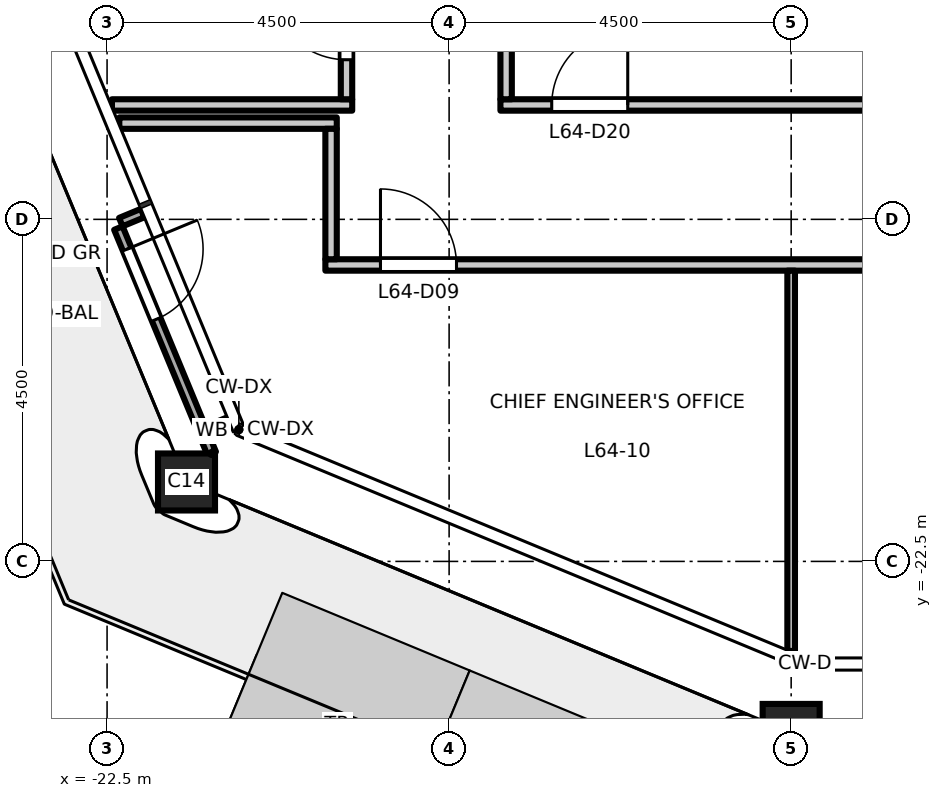
"""IFC4 building model, lengths in metres.
Left out: names, types, materials, properties, quantities, classifications, styles, units other than length and angle.
Written with IfcOpenShell. Run it as: python <this file> out.ifc"""

import sys

from ifc_helpers import new_model, si_unit, direction, frame, frame_2d, origin, origin_2d, place, context, subcontext, project, spatial, rectangle, hollow_rectangle, extrude, element, fill, save


model = new_model("IFC4")
c1 = context("Model", 3, precision=1e-05, world=origin(), true_north=direction((0.0, 1.0)))
c2 = subcontext(c1, "Body", "Model", "MODEL_VIEW")
j1 = project(units=[si_unit("LENGTHUNIT", "METRE"), si_unit("PLANEANGLEUNIT", "RADIAN")], contexts=[c1])
p1 = place(None, origin())
s1 = spatial("IfcSite", under=j1, at=p1, CompositionType="ELEMENT")
p2 = place(p1, origin())
s2 = spatial("IfcBuilding", under=s1, at=p2, CompositionType="ELEMENT")
p3 = place(p2, frame((0.0, 0.0, 298.7)))
s3 = spatial("IfcBuildingStorey", under=s2, at=p3, CompositionType="ELEMENT", Elevation=298.7)
for number, where, z_axis, x_axis in (
    (1, (-13.5, -24.75, 0.0), (0.0, 0.0, 1.0), (1.0, 0.0, 0.0)),
    (2, (-21.455, -21.455, 0.0), (0.0, 0.0, 1.0), (1.0, 0.0, 0.0)),
):
    element("IfcColumn", number, at=place(p3, frame(where, z_axis=z_axis, x_axis=x_axis)), inside=s3, PredefinedType="COLUMN", context=c2, shape_type="SweptSolid", body=[
        extrude(hollow_rectangle(XDim=0.75, YDim=0.75, WallThickness=0.04, at=origin_2d()), origin(), (0.0, 0.0, 1.0), 4.5),
    ])
p4 = place(p3, frame((-22.033, -17.917, 0.0), z_axis=(0.0, 0.0, 1.0), x_axis=(-0.923844027884, -0.382769136873, 0.0)))
e3 = element("IfcWall", 3, at=p4, inside=s3, PredefinedType="STANDARD", context=c2, shape_type="SweptSolid", body=[
    extrude(rectangle(XDim=0.31, YDim=0.12, at=frame_2d((0.155, 0.0))), origin(), (0.0, 0.0, 1.0), 4.35),
])
p5 = place(p3, frame((-20.896, -20.66, 0.0), z_axis=(0.0, 0.0, 1.0), x_axis=(-0.923959293734, -0.382490814953, 0.0)))
e4 = element("IfcWall", 4, at=p5, inside=s3, PredefinedType="STANDARD", context=c2, shape_type="SweptSolid", body=[
    extrude(rectangle(XDim=0.31, YDim=0.12, at=frame_2d((0.155, 0.0))), origin(), (0.0, 0.0, 1.0), 4.35),
])
p6 = place(p3, frame((-22.352, -18.115, 0.0), z_axis=(0.0, 0.0, 1.0), x_axis=(0.382680969843, -0.923880552517, 0.0)))
e5 = element("IfcWall", 5, at=p6, inside=s3, PredefinedType="STANDARD", context=c2, shape_type="SweptSolid", body=[
    extrude(rectangle(XDim=3.21, YDim=0.12, at=frame_2d((1.605, 0.0))), origin(), (0.0, 0.0, 1.0), 4.35),
])
p7 = place(p6, frame((0.3, 0.0, 0.0)))
e6 = element("IfcOpeningElement", 6, at=p7, cuts=e5, PredefinedType="OPENING", context=c2, shape_type="SweptSolid", body=[
    extrude(rectangle(XDim=1.0, YDim=2.4, at=frame_2d((0.5, 1.2))), frame((0.0, 0.07, 0.0), z_axis=(0.0, -1.0, 0.0), x_axis=(1.0, 0.0, 0.0)), (0.0, 0.0, 1.0), 0.14),
])
p8 = place(p3, frame((-19.628, -18.6, 0.0), z_axis=(0.0, 0.0, 1.0), x_axis=(1.0, 0.0, 0.0)))
e7 = element("IfcWall", 7, at=p8, inside=s3, PredefinedType="PARTITIONING", context=c2, shape_type="SweptSolid", body=[
    extrude(rectangle(XDim=41.194, YDim=0.15, at=frame_2d((20.597, 0.0))), origin(), (0.0, 0.0, 1.0), 4.35),
])
p9 = place(p8, frame((13.528, 0.0, 0.0)))
e8 = element("IfcOpeningElement", 8, at=p9, cuts=e7, PredefinedType="OPENING", context=c2, shape_type="SweptSolid", body=[
    extrude(rectangle(XDim=1.0, YDim=2.1, at=frame_2d((0.5, 1.05))), frame((0.0, 0.085, 0.0), z_axis=(0.0, -1.0, 0.0), x_axis=(1.0, 0.0, 0.0)), (0.0, 0.0, 1.0), 0.17),
])
p10 = place(p8, frame((15.778, 0.0, 0.0)))
e9 = element("IfcOpeningElement", 9, at=p10, cuts=e7, PredefinedType="OPENING", context=c2, shape_type="SweptSolid", body=[
    extrude(rectangle(XDim=1.0, YDim=2.1, at=frame_2d((0.5, 1.05))), frame((0.0, 0.085, 0.0), z_axis=(0.0, -1.0, 0.0), x_axis=(1.0, 0.0, 0.0)), (0.0, 0.0, 1.0), 0.17),
])
p11 = place(p8, frame((31.528, 0.0, 0.0)))
e10 = element("IfcOpeningElement", 10, at=p11, cuts=e7, PredefinedType="OPENING", context=c2, shape_type="SweptSolid", body=[
    extrude(rectangle(XDim=1.0, YDim=2.1, at=frame_2d((0.5, 1.05))), frame((0.0, 0.085, 0.0), z_axis=(0.0, -1.0, 0.0), x_axis=(1.0, 0.0, 0.0)), (0.0, 0.0, 1.0), 0.17),
])
p12 = place(p8, frame((0.725, 0.0, 0.0)))
e11 = element("IfcOpeningElement", 11, at=p12, cuts=e7, PredefinedType="OPENING", context=c2, shape_type="SweptSolid", body=[
    extrude(rectangle(XDim=1.0, YDim=2.1, at=frame_2d((0.5, 1.05))), frame((0.0, 0.085, 0.0), z_axis=(0.0, -1.0, 0.0), x_axis=(1.0, 0.0, 0.0)), (0.0, 0.0, 1.0), 0.17),
])
p13 = place(p8, frame((39.528, 0.0, 0.0)))
e12 = element("IfcOpeningElement", 12, at=p13, cuts=e7, PredefinedType="OPENING", context=c2, shape_type="SweptSolid", body=[
    extrude(rectangle(XDim=1.0, YDim=2.1, at=frame_2d((0.5, 1.05))), frame((0.0, 0.085, 0.0), z_axis=(0.0, -1.0, 0.0), x_axis=(1.0, 0.0, 0.0)), (0.0, 0.0, 1.0), 0.17),
])
p14 = place(p3, frame((-22.339, -16.734, 0.0), z_axis=(0.0, 0.0, 1.0), x_axis=(1.0, 0.0, 0.0)))
e13 = element("IfcWall", 13, at=p14, inside=s3, PredefinedType="PARTITIONING", context=c2, shape_type="SweptSolid", body=[
    extrude(rectangle(XDim=2.861, YDim=0.15, at=frame_2d((1.431, 0.0))), origin(), (0.0, 0.0, 1.0), 4.35),
])
p15 = place(p3, frame((-22.436, -16.495, 0.0), z_axis=(0.0, 0.0, 1.0), x_axis=(1.0, 0.0, 0.0)))
e14 = element("IfcWall", 14, at=p15, inside=s3, PredefinedType="PARTITIONING", context=c2, shape_type="SweptSolid", body=[
    extrude(rectangle(XDim=3.161, YDim=0.15, at=frame_2d((1.581, 0.0))), origin(), (0.0, 0.0, 1.0), 4.35),
])
p16 = place(p3, frame((-17.325, -16.495, 0.0), z_axis=(0.0, 0.0, 1.0), x_axis=(1.0, 0.0, 0.0)))
e15 = element("IfcWall", 15, at=p16, inside=s3, PredefinedType="PARTITIONING", context=c2, shape_type="SweptSolid", body=[
    extrude(rectangle(XDim=34.65, YDim=0.15, at=frame_2d((17.325, 0.0))), origin(), (0.0, 0.0, 1.0), 4.35),
])
p17 = place(p16, frame((9.675, 0.0, 0.0)))
e16 = element("IfcOpeningElement", 16, at=p17, cuts=e15, PredefinedType="OPENING", context=c2, shape_type="SweptSolid", body=[
    extrude(rectangle(XDim=1.0, YDim=2.1, at=frame_2d((0.5, 1.05))), frame((0.0, 0.085, 0.0), z_axis=(0.0, -1.0, 0.0), x_axis=(1.0, 0.0, 0.0)), (0.0, 0.0, 1.0), 0.17),
])
p18 = place(p16, frame((23.925, 0.0, 0.0)))
e17 = element("IfcOpeningElement", 17, at=p18, cuts=e15, PredefinedType="OPENING", context=c2, shape_type="SweptSolid", body=[
    extrude(rectangle(XDim=1.0, YDim=2.1, at=frame_2d((0.5, 1.05))), frame((0.0, 0.085, 0.0), z_axis=(0.0, -1.0, 0.0), x_axis=(1.0, 0.0, 0.0)), (0.0, 0.0, 1.0), 0.17),
])
p19 = place(p16, frame((0.675, 0.0, 0.0)))
e18 = element("IfcOpeningElement", 18, at=p19, cuts=e15, PredefinedType="OPENING", context=c2, shape_type="SweptSolid", body=[
    extrude(rectangle(XDim=1.0, YDim=2.1, at=frame_2d((0.5, 1.05))), frame((0.0, 0.085, 0.0), z_axis=(0.0, -1.0, 0.0), x_axis=(1.0, 0.0, 0.0)), (0.0, 0.0, 1.0), 0.17),
])
p20 = place(p16, frame((32.925, 0.0, 0.0)))
e19 = element("IfcOpeningElement", 19, at=p20, cuts=e15, PredefinedType="OPENING", context=c2, shape_type="SweptSolid", body=[
    extrude(rectangle(XDim=1.0, YDim=2.1, at=frame_2d((0.5, 1.05))), frame((0.0, 0.085, 0.0), z_axis=(0.0, -1.0, 0.0), x_axis=(1.0, 0.0, 0.0)), (0.0, 0.0, 1.0), 0.17),
])
p21 = place(p3, frame((-19.553, -18.525, 0.0), z_axis=(0.0, 0.0, 1.0), x_axis=(0.0, 1.0, 0.0)))
e20 = element("IfcWall", 20, at=p21, inside=s3, PredefinedType="PARTITIONING", context=c2, shape_type="SweptSolid", body=[
    extrude(rectangle(XDim=1.716, YDim=0.15, at=frame_2d((0.858, 0.0))), origin(), (0.0, 0.0, 1.0), 4.35),
])
p22 = place(p3, frame((-19.35, -16.42, 0.0), z_axis=(0.0, 0.0, 1.0), x_axis=(0.0, 1.0, 0.0)))
e21 = element("IfcWall", 21, at=p22, inside=s3, PredefinedType="PARTITIONING", context=c2, shape_type="SweptSolid", body=[
    extrude(rectangle(XDim=32.845, YDim=0.15, at=frame_2d((16.422, 0.0))), origin(), (0.0, 0.0, 1.0), 4.35),
])
p23 = place(p22, frame((0.52, 0.0, 0.0)))
e22 = element("IfcOpeningElement", 22, at=p23, cuts=e21, PredefinedType="OPENING", context=c2, shape_type="SweptSolid", body=[
    extrude(rectangle(XDim=1.0, YDim=2.1, at=frame_2d((0.5, 1.05))), frame((0.0, 0.085, 0.0), z_axis=(0.0, -1.0, 0.0), x_axis=(1.0, 0.0, 0.0)), (0.0, 0.0, 1.0), 0.17),
])
p24 = place(p3, frame((-17.25, -16.42, 0.0), z_axis=(0.0, 0.0, 1.0), x_axis=(0.0, 1.0, 0.0)))
e23 = element("IfcWall", 23, at=p24, inside=s3, PredefinedType="PARTITIONING", context=c2, shape_type="SweptSolid", body=[
    extrude(rectangle(XDim=2.92, YDim=0.15, at=frame_2d((1.46, 0.0))), origin(), (0.0, 0.0, 1.0), 4.35),
])
p25 = place(p3, frame((-13.5, -23.678, 0.0), z_axis=(0.0, 0.0, 1.0), x_axis=(0.0, 1.0, 0.0)))
e24 = element("IfcWall", 24, at=p25, inside=s3, PredefinedType="PARTITIONING", context=c2, shape_type="SweptSolid", body=[
    extrude(rectangle(XDim=5.003, YDim=0.1, at=frame_2d((2.501, 0.0))), origin(), (0.0, 0.0, 1.0), 3.75),
])
p26 = place(p7, origin())
e25 = element("IfcDoor", 25, at=p26, inside=s3, OperationType="SINGLE_SWING_LEFT", PredefinedType="DOOR", context=c2, shape_type="SweptSolid", body=[
    extrude(rectangle(XDim=1.0, YDim=2.4, at=frame_2d((0.5, 1.2))), frame((0.0, 0.025, 0.0), z_axis=(0.0, -1.0, 0.0), x_axis=(1.0, 0.0, 0.0)), (0.0, 0.0, 1.0), 0.05),
])
fill(e6, e25)
p27 = place(p12, origin())
e26 = element("IfcDoor", 26, at=p27, inside=s3, OperationType="SINGLE_SWING_LEFT", PredefinedType="DOOR", context=c2, shape_type="SweptSolid", body=[
    extrude(rectangle(XDim=1.0, YDim=2.1, at=frame_2d((0.5, 1.05))), frame((0.0, 0.025, 0.0), z_axis=(0.0, -1.0, 0.0), x_axis=(1.0, 0.0, 0.0)), (0.0, 0.0, 1.0), 0.05),
])
fill(e11, e26)
p28 = place(p19, origin())
e27 = element("IfcDoor", 27, at=p28, inside=s3, OperationType="SINGLE_SWING_RIGHT", PredefinedType="DOOR", context=c2, shape_type="SweptSolid", body=[
    extrude(rectangle(XDim=1.0, YDim=2.1, at=frame_2d((0.5, 1.05))), frame((0.0, 0.025, 0.0), z_axis=(0.0, -1.0, 0.0), x_axis=(1.0, 0.0, 0.0)), (0.0, 0.0, 1.0), 0.05),
])
fill(e18, e27)
p29 = place(p23, origin())
e28 = element("IfcDoor", 28, at=p29, inside=s3, OperationType="SINGLE_SWING_RIGHT", PredefinedType="DOOR", context=c2, shape_type="SweptSolid", body=[
    extrude(rectangle(XDim=1.0, YDim=2.1, at=frame_2d((0.5, 1.05))), frame((0.0, 0.025, 0.0), z_axis=(0.0, -1.0, 0.0), x_axis=(1.0, 0.0, 0.0)), (0.0, 0.0, 1.0), 0.05),
])
fill(e22, e28)
save(model, sys.argv[1])
